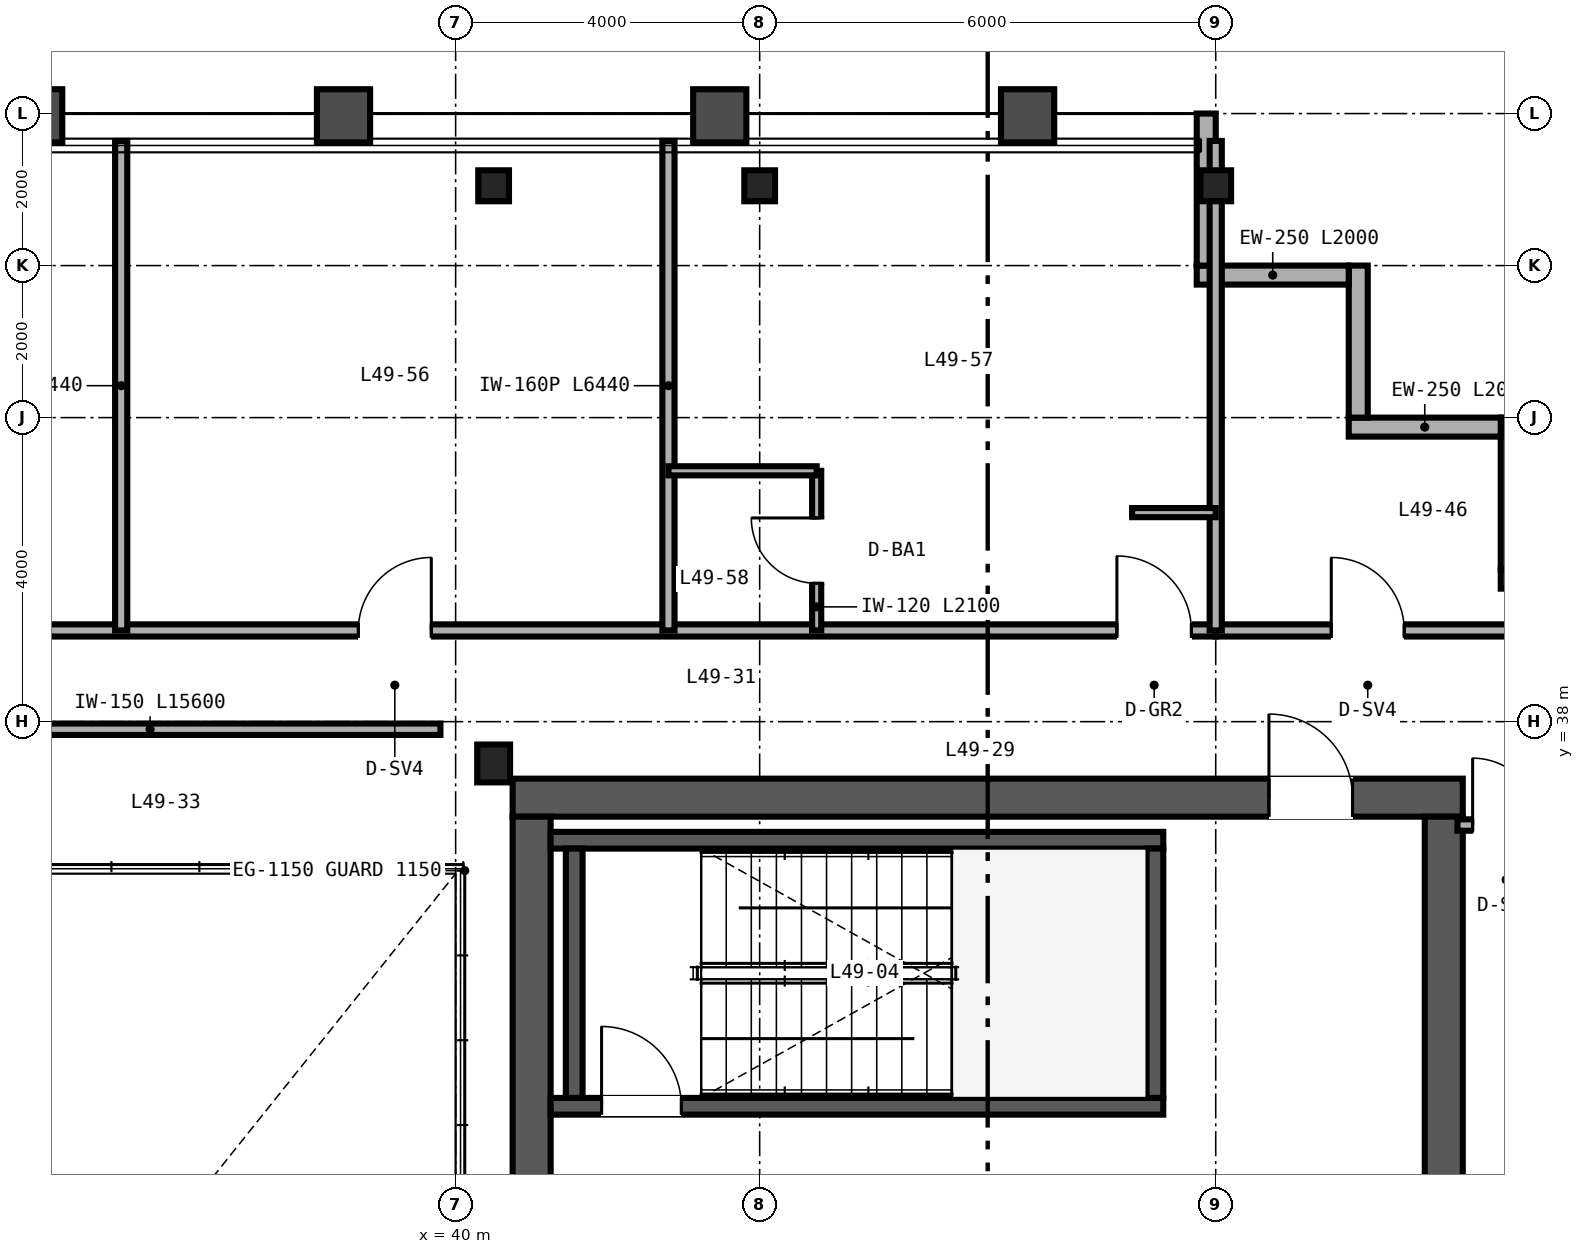
"""IFC4 building model, lengths in metres.
Left out: names, types, materials, properties, quantities, classifications, styles, units other than length and angle.
Written with IfcOpenShell. Run it as: python <this file> out.ifc"""

import sys

from ifc_helpers import new_model, si_unit, direction, frame, frame_2d, origin, origin_2d, place, context, subcontext, project, spatial, rectangle, i_section, extrude, source, transform, mapped, element, fill, save


model = new_model("IFC4")
c1 = context("Model", 3, precision=1e-05, world=origin(), true_north=direction((0.0, 1.0)))
c2 = subcontext(c1, "Body", "Model", "MODEL_VIEW")
j1 = project(units=[si_unit("LENGTHUNIT", "METRE"), si_unit("PLANEANGLEUNIT", "RADIAN")], contexts=[c1])
p1 = place(None, origin())
s1 = spatial("IfcSite", under=j1, at=p1, CompositionType="ELEMENT")
p2 = place(p1, origin())
s2 = spatial("IfcBuilding", under=s1, at=p2, CompositionType="ELEMENT")
p3 = place(p2, frame((0.0, 0.0, 195.6)))
s3 = spatial("IfcBuildingStorey", under=s2, at=p3, CompositionType="ELEMENT", Elevation=195.6)
p4 = place(p3, frame((40.75, 37.0, 0.0), z_axis=(0.0, 0.0, 1.0), x_axis=(1.0, 0.0, 0.0)))
e1 = element("IfcWall", 1, at=p4, inside=s3, PredefinedType="SHEAR", context=c2, shape_type="SweptSolid", body=[
    extrude(rectangle(XDim=12.5, YDim=0.5, at=frame_2d((6.25, 0.0))), origin(), (0.0, 0.0, 1.0), 3.37),
])
p5 = place(p4, frame((9.95, 0.0, 0.0)))
e2 = element("IfcOpeningElement", 2, at=p5, cuts=e1, PredefinedType="OPENING", context=c2, shape_type="SweptSolid", body=[
    extrude(rectangle(XDim=1.1, YDim=2.15, at=frame_2d((0.55, 1.075))), frame((0.0, 0.26, 0.0), z_axis=(0.0, -1.0, 0.0), x_axis=(1.0, 0.0, 0.0)), (0.0, 0.0, 1.0), 0.52),
])
for number, where, z_axis, x_axis in (
    (3, (41.0, 15.25, 0.0), (0.0, 0.0, 1.0), (0.0, 1.0, 0.0)),
    (4, (53.0, 15.25, 0.0), (0.0, 0.0, 1.0), (0.0, 1.0, 0.0)),
):
    element("IfcWall", number, at=place(p3, frame(where, z_axis=z_axis, x_axis=x_axis)), inside=s3, PredefinedType="SHEAR", context=c2, shape_type="SweptSolid", body=[
        extrude(rectangle(XDim=21.5, YDim=0.5, at=frame_2d((10.75, 0.0))), origin(), (0.0, 0.0, 1.0), 3.37),
    ])
p6 = place(p3, frame((41.25, 32.94, 0.0), z_axis=(0.0, 0.0, 1.0), x_axis=(1.0, 0.0, 0.0)))
e5 = element("IfcWall", 5, at=p6, inside=s3, PredefinedType="SHEAR", context=c2, shape_type="SweptSolid", body=[
    extrude(rectangle(XDim=8.06, YDim=0.22, at=frame_2d((4.03, 0.0))), origin(), (0.0, 0.0, 1.0), 3.4),
])
p7 = place(p6, frame((0.67, 0.0, 0.0)))
e6 = element("IfcOpeningElement", 6, at=p7, cuts=e5, PredefinedType="OPENING", context=c2, shape_type="SweptSolid", body=[
    extrude(rectangle(XDim=1.05, YDim=2.15, at=frame_2d((0.525, 1.075))), frame((0.0, 0.12, 0.0), z_axis=(0.0, -1.0, 0.0), x_axis=(1.0, 0.0, 0.0)), (0.0, 0.0, 1.0), 0.24),
])
p8 = place(p3, frame((41.25, 36.44, 0.0), z_axis=(0.0, 0.0, 1.0), x_axis=(1.0, 0.0, 0.0)))
e7 = element("IfcWall", 7, at=p8, inside=s3, PredefinedType="SHEAR", context=c2, shape_type="SweptSolid", body=[
    extrude(rectangle(XDim=8.06, YDim=0.22, at=frame_2d((4.03, 0.0))), origin(), (0.0, 0.0, 1.0), 3.4),
])
for number, where, z_axis, x_axis in (
    (8, (41.56, 33.05, 0.0), (0.0, 0.0, 1.0), (0.0, 1.0, 0.0)),
    (9, (49.2, 33.05, 0.0), (0.0, 0.0, 1.0), (0.0, 1.0, 0.0)),
):
    element("IfcWall", number, at=place(p3, frame(where, z_axis=z_axis, x_axis=x_axis)), inside=s3, PredefinedType="SHEAR", context=c2, shape_type="SweptSolid", body=[
        extrude(rectangle(XDim=3.28, YDim=0.22, at=frame_2d((1.64, 0.0))), origin(), (0.0, 0.0, 1.0), 3.4),
    ])
m1 = source(origin(), c2, "Body", "SweptSolid", [
    extrude(i_section(OverallWidth=0.432, OverallDepth=0.498, WebThickness=0.056, FlangeThickness=0.089, FilletRadius=0.025, at=origin_2d()), origin(), (0.0, 0.0, 1.0), 3.37),
])
p9 = place(p3, frame((40.5, 37.45, 0.0), z_axis=(0.0, 0.0, 1.0), x_axis=(1.0, 0.0, 0.0)))
e10 = element("IfcColumn", 10, at=p9, inside=s3, PredefinedType="COLUMN", context=c2, shape_type="MappedRepresentation", body=[
    mapped(m1, transform((0.0, 0.0, 0.0), scale=1.0)),
])
m2 = source(origin(), c2, "Body", "SweptSolid", [
    extrude(i_section(OverallWidth=0.404, OverallDepth=0.407, WebThickness=0.027, FlangeThickness=0.044, FilletRadius=0.025, at=origin_2d()), origin(), (0.0, 0.0, 1.0), 3.37),
])
for number, where, z_axis, x_axis in (
    (11, (40.5, 45.05, 0.0), (0.0, 0.0, 1.0), (1.0, 0.0, 0.0)),
    (12, (44.0, 45.05, 0.0), (0.0, 0.0, 1.0), (1.0, 0.0, 0.0)),
    (13, (50.0, 45.05, 0.0), (0.0, 0.0, 1.0), (1.0, 0.0, 0.0)),
):
    element("IfcColumn", number, at=place(p3, frame(where, z_axis=z_axis, x_axis=x_axis)), inside=s3, PredefinedType="COLUMN", context=c2, shape_type="MappedRepresentation", body=[
        mapped(m2, transform((0.0, 0.0, 0.0), scale=1.0)),
    ])
p10 = place(p3, frame((56.0, 39.875, 0.0), z_axis=(0.0, 0.0, 1.0), x_axis=(-1.0, 0.0, 0.0)))
e14 = element("IfcWall", 14, at=p10, inside=s3, PredefinedType="SOLIDWALL", context=c2, shape_type="SweptSolid", body=[
    extrude(rectangle(XDim=2.25, YDim=0.25, at=frame_2d((1.125, 0.0))), origin(), (0.0, 0.0, 1.0), 3.37),
])
for number, where, z_axis, x_axis in (
    (15, (53.875, 40.0, 0.0), (0.0, 0.0, 1.0), (0.0, 1.0, 0.0)),
    (16, (53.75, 41.875, 0.0), (0.0, 0.0, 1.0), (-1.0, 0.0, 0.0)),
    (17, (51.875, 42.0, 0.0), (0.0, 0.0, 1.0), (0.0, 1.0, 0.0)),
    (18, (51.75, 43.875, 0.0), (0.0, 0.0, 1.0), (-1.0, 0.0, 0.0)),
):
    element("IfcWall", number, at=place(p3, frame(where, z_axis=z_axis, x_axis=x_axis)), inside=s3, PredefinedType="SOLIDWALL", context=c2, shape_type="SweptSolid", body=[
        extrude(rectangle(XDim=2.0, YDim=0.25, at=frame_2d((1.0, 0.0))), origin(), (0.0, 0.0, 1.0), 3.37),
    ])
p11 = place(p3, frame((49.875, 44.0, 0.0), z_axis=(0.0, 0.0, 1.0), x_axis=(0.0, 1.0, 0.0)))
e19 = element("IfcWall", 19, at=p11, inside=s3, PredefinedType="SOLIDWALL", context=c2, shape_type="SweptSolid", body=[
    extrude(rectangle(XDim=2.0, YDim=0.25, at=frame_2d((1.0, 0.0))), origin(), (0.0, 0.0, 1.0), 2.677),
])
p12 = place(p3, frame((24.2, 37.9, 0.0), z_axis=(0.0, 0.0, 1.0), x_axis=(1.0, 0.0, 0.0)))
e20 = element("IfcWall", 20, at=p12, inside=s3, PredefinedType="PARTITIONING", context=c2, shape_type="SweptSolid", body=[
    extrude(rectangle(XDim=15.6, YDim=0.15, at=frame_2d((7.8, 0.0))), origin(), (0.0, 0.0, 1.0), 3.37),
])
p13 = place(p12, frame((7.0, 0.0, 0.0)))
e21 = element("IfcOpeningElement", 21, at=p13, cuts=e20, PredefinedType="OPENING", context=c2, shape_type="SweptSolid", body=[
    extrude(rectangle(XDim=0.96, YDim=2.15, at=frame_2d((0.48, 1.075))), frame((0.0, 0.085, 0.0), z_axis=(0.0, -1.0, 0.0), x_axis=(1.0, 0.0, 0.0)), (0.0, 0.0, 1.0), 0.17),
])
p14 = place(p3, frame((53.18, 36.64, 0.0), z_axis=(0.0, 0.0, 1.0), x_axis=(1.0, 0.0, 0.0)))
e22 = element("IfcWall", 22, at=p14, inside=s3, PredefinedType="PARTITIONING", context=c2, shape_type="SweptSolid", body=[
    extrude(rectangle(XDim=2.66, YDim=0.15, at=frame_2d((1.33, 0.0))), origin(), (0.0, 0.0, 1.0), 2.753),
])
p15 = place(p14, frame((0.2, 0.0, 0.0)))
e23 = element("IfcOpeningElement", 23, at=p15, cuts=e22, PredefinedType="OPENING", context=c2, shape_type="SweptSolid", body=[
    extrude(rectangle(XDim=0.88, YDim=2.15, at=frame_2d((0.44, 1.075))), frame((0.0, 0.085, 0.0), z_axis=(0.0, -1.0, 0.0), x_axis=(1.0, 0.0, 0.0)), (0.0, 0.0, 1.0), 0.17),
])
p16 = place(p3, frame((50.0, 39.2, 0.0), z_axis=(0.0, 0.0, 1.0), x_axis=(1.0, 0.0, 0.0)))
e24 = element("IfcWall", 24, at=p16, inside=s3, PredefinedType="PARTITIONING", context=c2, shape_type="SweptSolid", body=[
    extrude(rectangle(XDim=4.0, YDim=0.16, at=frame_2d((2.0, 0.0))), origin(), (0.0, 0.0, 1.0), 3.37),
])
p17 = place(p16, frame((1.52, 0.0, 0.0)))
e25 = element("IfcOpeningElement", 25, at=p17, cuts=e24, PredefinedType="OPENING", context=c2, shape_type="SweptSolid", body=[
    extrude(rectangle(XDim=0.96, YDim=2.15, at=frame_2d((0.48, 1.075))), frame((0.0, 0.09, 0.0), z_axis=(0.0, -1.0, 0.0), x_axis=(1.0, 0.0, 0.0)), (0.0, 0.0, 1.0), 0.18),
])
p18 = place(p3, frame((14.0, 39.2, 0.0), z_axis=(0.0, 0.0, 1.0), x_axis=(1.0, 0.0, 0.0)))
e26 = element("IfcWall", 26, at=p18, inside=s3, PredefinedType="PARTITIONING", context=c2, shape_type="SweptSolid", body=[
    extrude(rectangle(XDim=36.0, YDim=0.16, at=frame_2d((18.0, 0.0))), origin(), (0.0, 0.0, 1.0), 2.913),
])
p19 = place(p18, frame((5.9, 0.0, 0.0)))
e27 = element("IfcOpeningElement", 27, at=p19, cuts=e26, PredefinedType="OPENING", context=c2, shape_type="SweptSolid", body=[
    extrude(rectangle(XDim=0.98, YDim=2.2, at=frame_2d((0.49, 1.1))), frame((0.0, 0.09, 0.0), z_axis=(0.0, -1.0, 0.0), x_axis=(1.0, 0.0, 0.0)), (0.0, 0.0, 1.0), 0.18),
])
p20 = place(p18, frame((10.32, 0.0, 0.0)))
e28 = element("IfcOpeningElement", 28, at=p20, cuts=e26, PredefinedType="OPENING", context=c2, shape_type="SweptSolid", body=[
    extrude(rectangle(XDim=0.96, YDim=2.15, at=frame_2d((0.48, 1.075))), frame((0.0, 0.09, 0.0), z_axis=(0.0, -1.0, 0.0), x_axis=(1.0, 0.0, 0.0)), (0.0, 0.0, 1.0), 0.18),
])
p21 = place(p18, frame((17.52, 0.0, 0.0)))
e29 = element("IfcOpeningElement", 29, at=p21, cuts=e26, PredefinedType="OPENING", context=c2, shape_type="SweptSolid", body=[
    extrude(rectangle(XDim=0.96, YDim=2.15, at=frame_2d((0.48, 1.075))), frame((0.0, 0.09, 0.0), z_axis=(0.0, -1.0, 0.0), x_axis=(1.0, 0.0, 0.0)), (0.0, 0.0, 1.0), 0.18),
])
p22 = place(p18, frame((24.72, 0.0, 0.0)))
e30 = element("IfcOpeningElement", 30, at=p22, cuts=e26, PredefinedType="OPENING", context=c2, shape_type="SweptSolid", body=[
    extrude(rectangle(XDim=0.96, YDim=2.15, at=frame_2d((0.48, 1.075))), frame((0.0, 0.09, 0.0), z_axis=(0.0, -1.0, 0.0), x_axis=(1.0, 0.0, 0.0)), (0.0, 0.0, 1.0), 0.18),
])
p23 = place(p18, frame((34.7, 0.0, 0.0)))
e31 = element("IfcOpeningElement", 31, at=p23, cuts=e26, PredefinedType="OPENING", context=c2, shape_type="SweptSolid", body=[
    extrude(rectangle(XDim=0.98, YDim=2.2, at=frame_2d((0.49, 1.1))), frame((0.0, 0.09, 0.0), z_axis=(0.0, -1.0, 0.0), x_axis=(1.0, 0.0, 0.0)), (0.0, 0.0, 1.0), 0.18),
])
p24 = place(p3, frame((50.0, 39.2, 0.0), z_axis=(0.0, 0.0, 1.0), x_axis=(0.0, 1.0, 0.0)))
e32 = element("IfcWall", 32, at=p24, inside=s3, PredefinedType="PARTITIONING", context=c2, shape_type="SweptSolid", body=[
    extrude(rectangle(XDim=6.44, YDim=0.16, at=frame_2d((3.22, 0.0))), origin(), (0.0, 0.0, 1.0), 2.677),
])
p25 = place(p3, frame((35.6, 39.2, 0.0), z_axis=(0.0, 0.0, 1.0), x_axis=(0.0, 1.0, 0.0)))
e33 = element("IfcWall", 33, at=p25, inside=s3, PredefinedType="PARTITIONING", context=c2, shape_type="SweptSolid", body=[
    extrude(rectangle(XDim=6.44, YDim=0.16, at=frame_2d((3.22, 0.0))), origin(), (0.0, 0.0, 1.0), 2.443),
])
p26 = place(p3, frame((42.8, 39.2, 0.0), z_axis=(0.0, 0.0, 1.0), x_axis=(0.0, 1.0, 0.0)))
e34 = element("IfcWall", 34, at=p26, inside=s3, PredefinedType="PARTITIONING", context=c2, shape_type="SweptSolid", body=[
    extrude(rectangle(XDim=6.44, YDim=0.16, at=frame_2d((3.22, 0.0))), origin(), (0.0, 0.0, 1.0), 2.833),
])
p27 = place(p3, frame((44.75, 39.2, 0.0), z_axis=(0.0, 0.0, 1.0), x_axis=(0.0, 1.0, 0.0)))
e35 = element("IfcWall", 35, at=p27, inside=s3, PredefinedType="PARTITIONING", context=c2, shape_type="SweptSolid", body=[
    extrude(rectangle(XDim=2.1, YDim=0.12, at=frame_2d((1.05, 0.0))), origin(), (0.0, 0.0, 1.0), 3.37),
])
p28 = place(p27, frame((0.62, 0.0, 0.0)))
e36 = element("IfcOpeningElement", 36, at=p28, cuts=e35, PredefinedType="OPENING", context=c2, shape_type="SweptSolid", body=[
    extrude(rectangle(XDim=0.86, YDim=2.1, at=frame_2d((0.43, 1.05))), frame((0.0, 0.07, 0.0), z_axis=(0.0, -1.0, 0.0), x_axis=(1.0, 0.0, 0.0)), (0.0, 0.0, 1.0), 0.14),
])
p29 = place(p3, frame((42.8, 41.3, 0.0), z_axis=(0.0, 0.0, 1.0), x_axis=(1.0, 0.0, 0.0)))
e37 = element("IfcWall", 37, at=p29, inside=s3, PredefinedType="PARTITIONING", context=c2, shape_type="SweptSolid", body=[
    extrude(rectangle(XDim=1.95, YDim=0.12, at=frame_2d((0.975, 0.0))), origin(), (0.0, 0.0, 1.0), 3.37),
])
p30 = place(p3, frame((48.9, 40.75, 0.0), z_axis=(0.0, 0.0, 1.0), x_axis=(1.0, 0.0, 0.0)))
e38 = element("IfcWall", 38, at=p30, inside=s3, PredefinedType="PARTITIONING", context=c2, shape_type="SweptSolid", body=[
    extrude(rectangle(XDim=1.1, YDim=0.12, at=frame_2d((0.55, 0.0))), origin(), (0.0, 0.0, 1.0), 3.37),
])
m3 = source(origin(), c2, "Body", "SweptSolid", [
    extrude(rectangle(XDim=1.05, YDim=2.15, at=frame_2d((0.525, 1.075))), frame((0.0, 0.025, 0.0), z_axis=(0.0, -1.0, 0.0), x_axis=(1.0, 0.0, 0.0)), (0.0, 0.0, 1.0), 0.05),
])
p31 = place(p7, origin())
e39 = element("IfcDoor", 39, at=p31, inside=s3, OperationType="SINGLE_SWING_LEFT", PredefinedType="DOOR", context=c2, shape_type="MappedRepresentation", body=[
    mapped(m3, transform((0.0, 0.0, 0.0), scale=1.0)),
])
fill(e6, e39)
m4 = source(origin(), c2, "Body", "SweptSolid", [
    extrude(rectangle(XDim=1.1, YDim=2.15, at=frame_2d((0.55, 1.075))), frame((0.0, 0.025, 0.0), z_axis=(0.0, -1.0, 0.0), x_axis=(1.0, 0.0, 0.0)), (0.0, 0.0, 1.0), 0.05),
])
p32 = place(p5, origin())
e40 = element("IfcDoor", 40, at=p32, inside=s3, OperationType="SINGLE_SWING_LEFT", PredefinedType="DOOR", context=c2, shape_type="MappedRepresentation", body=[
    mapped(m4, transform((0.0, 0.0, 0.0), scale=1.0)),
])
fill(e2, e40)
m5 = source(origin(), c2, "Body", "SweptSolid", [
    extrude(rectangle(XDim=0.88, YDim=2.15, at=frame_2d((0.44, 1.075))), frame((0.0, 0.025, 0.0), z_axis=(0.0, -1.0, 0.0), x_axis=(1.0, 0.0, 0.0)), (0.0, 0.0, 1.0), 0.05),
])
p33 = place(p15, origin())
e41 = element("IfcDoor", 41, at=p33, inside=s3, OperationType="SINGLE_SWING_LEFT", PredefinedType="DOOR", context=c2, shape_type="MappedRepresentation", body=[
    mapped(m5, transform((0.0, 0.0, 0.0), scale=1.0)),
])
fill(e23, e41)
m6 = source(origin(), c2, "Body", "SweptSolid", [
    extrude(rectangle(XDim=0.96, YDim=2.15, at=frame_2d((0.48, 1.075))), frame((0.0, 0.025, 0.0), z_axis=(0.0, -1.0, 0.0), x_axis=(1.0, 0.0, 0.0)), (0.0, 0.0, 1.0), 0.05),
])
p34 = place(p17, origin())
e42 = element("IfcDoor", 42, at=p34, inside=s3, OperationType="SINGLE_SWING_LEFT", PredefinedType="DOOR", context=c2, shape_type="MappedRepresentation", body=[
    mapped(m6, transform((0.0, 0.0, 0.0), scale=1.0)),
])
fill(e25, e42)
m7 = source(origin(), c2, "Body", "SweptSolid", [
    extrude(rectangle(XDim=0.86, YDim=2.1, at=frame_2d((0.43, 1.05))), frame((0.0, 0.025, 0.0), z_axis=(0.0, -1.0, 0.0), x_axis=(1.0, 0.0, 0.0)), (0.0, 0.0, 1.0), 0.05),
])
p35 = place(p28, origin())
e43 = element("IfcDoor", 43, at=p35, inside=s3, OperationType="SINGLE_SWING_RIGHT", PredefinedType="DOOR", context=c2, shape_type="MappedRepresentation", body=[
    mapped(m7, transform((0.0, 0.0, 0.0), scale=1.0)),
])
fill(e36, e43)
p36 = place(p22, origin())
e44 = element("IfcDoor", 44, at=p36, inside=s3, OperationType="SINGLE_SWING_RIGHT", PredefinedType="DOOR", context=c2, shape_type="MappedRepresentation", body=[
    mapped(m6, transform((0.0, 0.0, 0.0), scale=1.0)),
])
fill(e30, e44)
m8 = source(origin(), c2, "Body", "SweptSolid", [
    extrude(rectangle(XDim=0.98, YDim=2.2, at=frame_2d((0.49, 1.1))), frame((0.0, 0.025, 0.0), z_axis=(0.0, -1.0, 0.0), x_axis=(1.0, 0.0, 0.0)), (0.0, 0.0, 1.0), 0.05),
])
p37 = place(p23, origin())
e45 = element("IfcDoor", 45, at=p37, inside=s3, OperationType="SINGLE_SWING_LEFT", PredefinedType="DOOR", context=c2, shape_type="MappedRepresentation", body=[
    mapped(m8, transform((0.0, 0.0, 0.0), scale=1.0)),
])
fill(e31, e45)
save(model, sys.argv[1])
